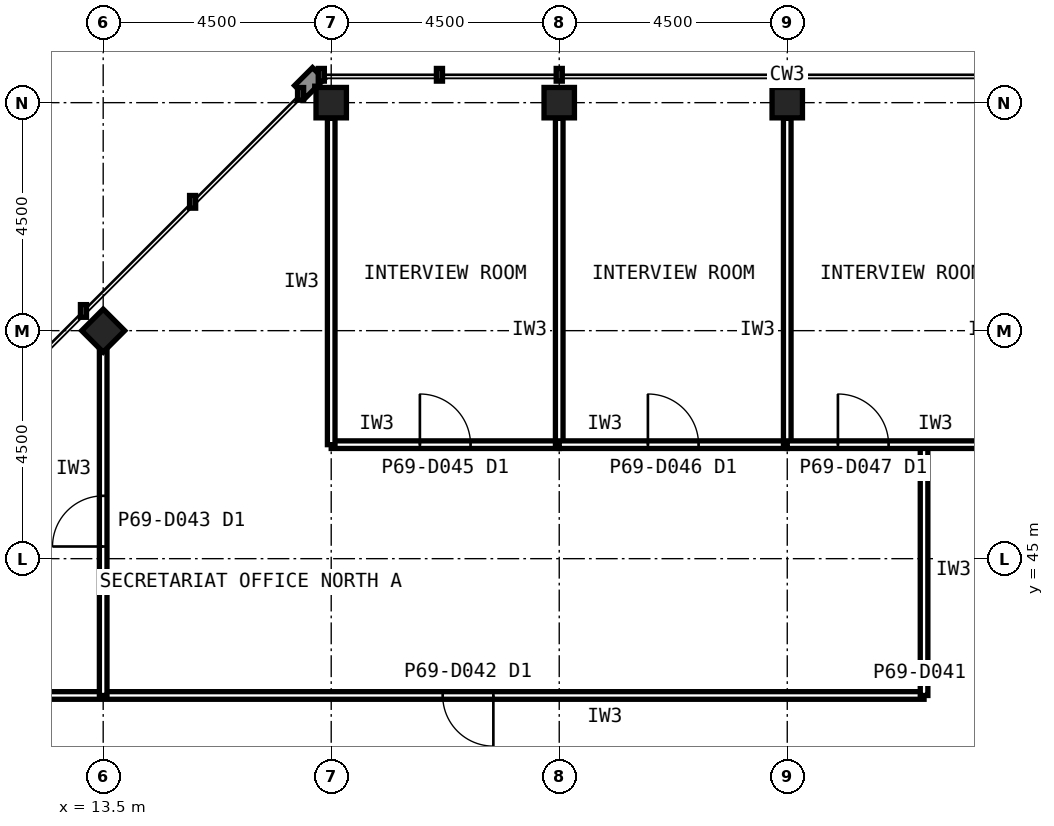
"""IFC4 building model, lengths in metres.
Left out: names, types, materials, properties, quantities, classifications, styles, units other than length and angle.
Written with IfcOpenShell. Run it as: python <this file> out.ifc"""

import sys

from ifc_helpers import new_model, si_unit, direction, frame, frame_2d, origin, origin_2d, place, context, subcontext, project, spatial, rectangle, hollow_rectangle, extrude, element, fill, save


model = new_model("IFC4")
c1 = context("Model", 3, precision=1e-05, world=origin(), true_north=direction((0.0, 1.0)))
c2 = subcontext(c1, "Body", "Model", "MODEL_VIEW")
j1 = project(units=[si_unit("LENGTHUNIT", "METRE"), si_unit("PLANEANGLEUNIT", "RADIAN")], contexts=[c1])
p1 = place(None, origin())
s1 = spatial("IfcSite", under=j1, at=p1, CompositionType="ELEMENT")
p2 = place(p1, origin())
s2 = spatial("IfcBuilding", under=s1, at=p2, CompositionType="ELEMENT")
p3 = place(p2, frame((0.0, 0.0, 286.6)))
s3 = spatial("IfcBuildingStorey", under=s2, at=p3, CompositionType="ELEMENT", Elevation=286.6)
for number, where, z_axis, x_axis in (
    (1, (27.0, 54.0, 0.0), (0.0, 0.0, 1.0), (1.0, 0.0, 0.0)),
    (2, (22.5, 54.0, 0.0), (0.0, 0.0, 1.0), (1.0, 0.0, 0.0)),
    (3, (18.0, 54.0, 0.0), (0.0, 0.0, 1.0), (1.0, 0.0, 0.0)),
    (4, (13.5, 49.5, 0.0), (0.0, 0.0, 1.0), (0.707, 0.707, 0.0)),
):
    element("IfcColumn", number, at=place(p3, frame(where, z_axis=z_axis, x_axis=x_axis)), inside=s3, PredefinedType="COLUMN", context=c2, shape_type="SweptSolid", body=[
        extrude(hollow_rectangle(XDim=0.6, YDim=0.6, WallThickness=0.028, at=origin_2d()), origin(), (0.0, 0.0, 1.0), 4.0),
    ])
p4 = place(p3, frame((29.7, 42.3, 0.0), z_axis=(0.0, 0.0, 1.0), x_axis=(-1.0, 0.0, 0.0)))
e5 = element("IfcWall", 5, at=p4, inside=s3, PredefinedType="PARTITIONING", context=c2, shape_type="SweptSolid", body=[
    extrude(rectangle(XDim=18.0, YDim=0.15, at=frame_2d((9.0, 0.0))), origin(), (0.0, 0.0, 1.0), 3.84),
])
p5 = place(p4, frame((8.5, 0.0, 0.0)))
e6 = element("IfcOpeningElement", 6, at=p5, cuts=e5, PredefinedType="OPENING", context=c2, shape_type="SweptSolid", body=[
    extrude(rectangle(XDim=1.0, YDim=2.1, at=frame_2d((0.5, 1.05))), frame((0.0, 0.085, 0.0), z_axis=(0.0, -1.0, 0.0), x_axis=(1.0, 0.0, 0.0)), (0.0, 0.0, 1.0), 0.17),
])
p6 = place(p3, frame((29.7, 47.25, 0.0), z_axis=(0.0, 0.0, 1.0), x_axis=(0.0, -1.0, 0.0)))
e7 = element("IfcWall", 7, at=p6, inside=s3, PredefinedType="PARTITIONING", context=c2, shape_type="SweptSolid", body=[
    extrude(rectangle(XDim=4.95, YDim=0.15, at=frame_2d((2.475, 0.0))), origin(), (0.0, 0.0, 1.0), 3.84),
])
p7 = place(p3, frame((18.0, 47.25, 0.0), z_axis=(0.0, 0.0, 1.0), x_axis=(1.0, 0.0, 0.0)))
e8 = element("IfcWall", 8, at=p7, inside=s3, PredefinedType="PARTITIONING", context=c2, shape_type="SweptSolid", body=[
    extrude(rectangle(XDim=4.5, YDim=0.15, at=frame_2d((2.25, 0.0))), origin(), (0.0, 0.0, 1.0), 3.84),
])
p8 = place(p7, frame((1.75, 0.0, 0.0)))
e9 = element("IfcOpeningElement", 9, at=p8, cuts=e8, PredefinedType="OPENING", context=c2, shape_type="SweptSolid", body=[
    extrude(rectangle(XDim=1.0, YDim=2.1, at=frame_2d((0.5, 1.05))), frame((0.0, 0.085, 0.0), z_axis=(0.0, -1.0, 0.0), x_axis=(1.0, 0.0, 0.0)), (0.0, 0.0, 1.0), 0.17),
])
for number, where, z_axis, x_axis in (
    (10, (22.5, 47.25, 0.0), (0.0, 0.0, 1.0), (0.0, 1.0, 0.0)),
    (11, (18.0, 53.69, 0.0), (0.0, 0.0, 1.0), (0.0, -1.0, 0.0)),
):
    element("IfcWall", number, at=place(p3, frame(where, z_axis=z_axis, x_axis=x_axis)), inside=s3, PredefinedType="PARTITIONING", context=c2, shape_type="SweptSolid", body=[
        extrude(rectangle(XDim=6.44, YDim=0.15, at=frame_2d((3.22, 0.0))), origin(), (0.0, 0.0, 1.0), 2.989),
    ])
p9 = place(p3, frame((22.5, 47.25, 0.0), z_axis=(0.0, 0.0, 1.0), x_axis=(1.0, 0.0, 0.0)))
e12 = element("IfcWall", 12, at=p9, inside=s3, PredefinedType="PARTITIONING", context=c2, shape_type="SweptSolid", body=[
    extrude(rectangle(XDim=4.5, YDim=0.15, at=frame_2d((2.25, 0.0))), origin(), (0.0, 0.0, 1.0), 3.84),
])
p10 = place(p9, frame((1.75, 0.0, 0.0)))
e13 = element("IfcOpeningElement", 13, at=p10, cuts=e12, PredefinedType="OPENING", context=c2, shape_type="SweptSolid", body=[
    extrude(rectangle(XDim=1.0, YDim=2.1, at=frame_2d((0.5, 1.05))), frame((0.0, 0.085, 0.0), z_axis=(0.0, -1.0, 0.0), x_axis=(1.0, 0.0, 0.0)), (0.0, 0.0, 1.0), 0.17),
])
p11 = place(p3, frame((27.0, 47.25, 0.0), z_axis=(0.0, 0.0, 1.0), x_axis=(0.0, 1.0, 0.0)))
e14 = element("IfcWall", 14, at=p11, inside=s3, PredefinedType="PARTITIONING", context=c2, shape_type="SweptSolid", body=[
    extrude(rectangle(XDim=6.44, YDim=0.15, at=frame_2d((3.22, 0.0))), origin(), (0.0, 0.0, 1.0), 2.989),
])
p12 = place(p3, frame((27.0, 47.25, 0.0), z_axis=(0.0, 0.0, 1.0), x_axis=(1.0, 0.0, 0.0)))
e15 = element("IfcWall", 15, at=p12, inside=s3, PredefinedType="PARTITIONING", context=c2, shape_type="SweptSolid", body=[
    extrude(rectangle(XDim=4.5, YDim=0.15, at=frame_2d((2.25, 0.0))), origin(), (0.0, 0.0, 1.0), 3.84),
])
p13 = place(p12, frame((1.0, 0.0, 0.0)))
e16 = element("IfcOpeningElement", 16, at=p13, cuts=e15, PredefinedType="OPENING", context=c2, shape_type="SweptSolid", body=[
    extrude(rectangle(XDim=1.0, YDim=2.1, at=frame_2d((0.5, 1.05))), frame((0.0, 0.085, 0.0), z_axis=(0.0, -1.0, 0.0), x_axis=(1.0, 0.0, 0.0)), (0.0, 0.0, 1.0), 0.17),
])
p14 = place(p3, frame((13.5, 42.3, 0.0), z_axis=(0.0, 0.0, 1.0), x_axis=(0.0, 1.0, 0.0)))
e17 = element("IfcWall", 17, at=p14, inside=s3, PredefinedType="PARTITIONING", context=c2, shape_type="SweptSolid", body=[
    extrude(rectangle(XDim=6.88, YDim=0.15, at=frame_2d((3.44, 0.0))), origin(), (0.0, 0.0, 1.0), 2.989),
])
p15 = place(p14, frame((2.94, 0.0, 0.0)))
e18 = element("IfcOpeningElement", 18, at=p15, cuts=e17, PredefinedType="OPENING", context=c2, shape_type="SweptSolid", body=[
    extrude(rectangle(XDim=1.0, YDim=2.1, at=frame_2d((0.5, 1.05))), frame((0.0, 0.085, 0.0), z_axis=(0.0, -1.0, 0.0), x_axis=(1.0, 0.0, 0.0)), (0.0, 0.0, 1.0), 0.17),
])
p16 = place(p5, origin())
e19 = element("IfcDoor", 19, at=p16, inside=s3, OperationType="SINGLE_SWING_LEFT", PredefinedType="DOOR", context=c2, shape_type="SweptSolid", body=[
    extrude(rectangle(XDim=1.0, YDim=2.1, at=frame_2d((0.5, 1.05))), frame((0.0, 0.025, 0.0), z_axis=(0.0, -1.0, 0.0), x_axis=(1.0, 0.0, 0.0)), (0.0, 0.0, 1.0), 0.05),
])
fill(e6, e19)
p17 = place(p8, origin())
e20 = element("IfcDoor", 20, at=p17, inside=s3, OperationType="SINGLE_SWING_LEFT", PredefinedType="DOOR", context=c2, shape_type="SweptSolid", body=[
    extrude(rectangle(XDim=1.0, YDim=2.1, at=frame_2d((0.5, 1.05))), frame((0.0, 0.025, 0.0), z_axis=(0.0, -1.0, 0.0), x_axis=(1.0, 0.0, 0.0)), (0.0, 0.0, 1.0), 0.05),
])
fill(e9, e20)
p18 = place(p10, origin())
e21 = element("IfcDoor", 21, at=p18, inside=s3, OperationType="SINGLE_SWING_LEFT", PredefinedType="DOOR", context=c2, shape_type="SweptSolid", body=[
    extrude(rectangle(XDim=1.0, YDim=2.1, at=frame_2d((0.5, 1.05))), frame((0.0, 0.025, 0.0), z_axis=(0.0, -1.0, 0.0), x_axis=(1.0, 0.0, 0.0)), (0.0, 0.0, 1.0), 0.05),
])
fill(e13, e21)
p19 = place(p13, origin())
e22 = element("IfcDoor", 22, at=p19, inside=s3, OperationType="SINGLE_SWING_LEFT", PredefinedType="DOOR", context=c2, shape_type="SweptSolid", body=[
    extrude(rectangle(XDim=1.0, YDim=2.1, at=frame_2d((0.5, 1.05))), frame((0.0, 0.025, 0.0), z_axis=(0.0, -1.0, 0.0), x_axis=(1.0, 0.0, 0.0)), (0.0, 0.0, 1.0), 0.05),
])
fill(e16, e22)
p20 = place(p15, origin())
e23 = element("IfcDoor", 23, at=p20, inside=s3, OperationType="SINGLE_SWING_LEFT", PredefinedType="DOOR", context=c2, shape_type="SweptSolid", body=[
    extrude(rectangle(XDim=1.0, YDim=2.1, at=frame_2d((0.5, 1.05))), frame((0.0, 0.025, 0.0), z_axis=(0.0, -1.0, 0.0), x_axis=(1.0, 0.0, 0.0)), (0.0, 0.0, 1.0), 0.05),
])
fill(e18, e23)
save(model, sys.argv[1])
